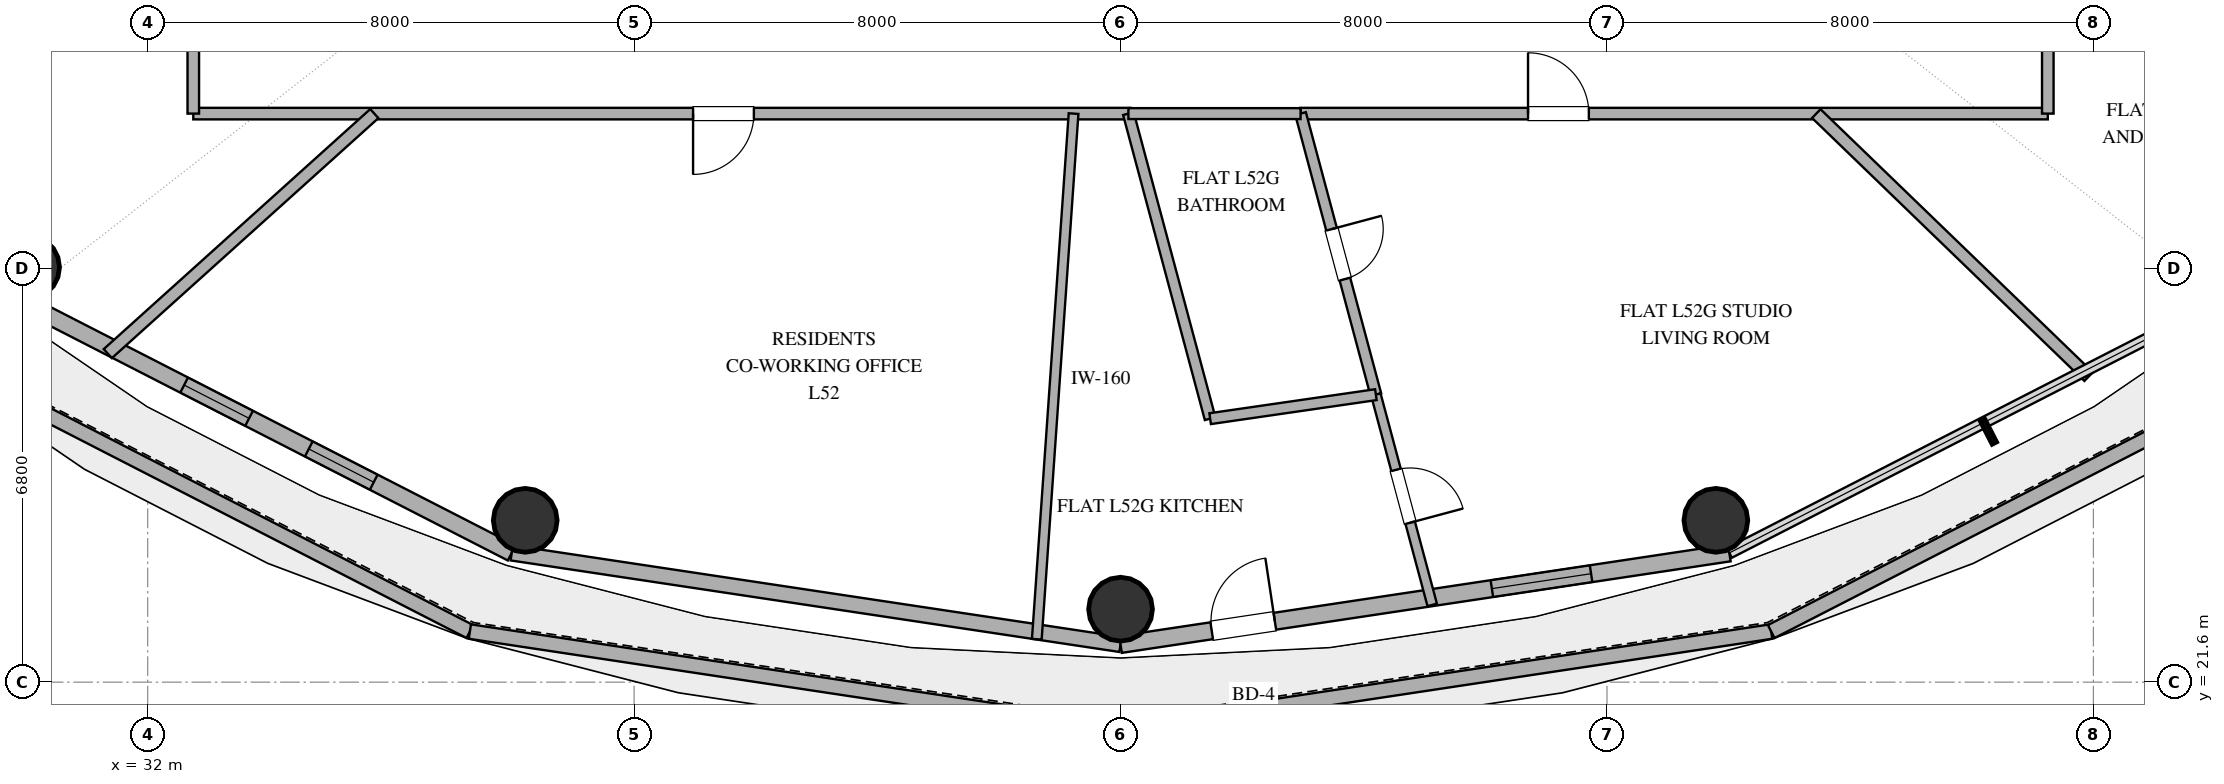
"""IFC4 building model, lengths in metres.
Left out: names, types, materials, properties, quantities, classifications, styles, units other than length and angle.
Written with IfcOpenShell. Run it as: python <this file> out.ifc"""

import sys

from ifc_helpers import new_model, si_unit, direction, frame, frame_2d, origin, origin_2d, place, context, subcontext, project, spatial, rectangle, hollow_circle, extrude, element, fill, save


model = new_model("IFC4")
c1 = context("Model", 3, precision=1e-05, world=origin(), true_north=direction((0.0, 1.0)))
c2 = subcontext(c1, "Body", "Model", "MODEL_VIEW")
j1 = project(units=[si_unit("LENGTHUNIT", "METRE"), si_unit("PLANEANGLEUNIT", "RADIAN")], contexts=[c1])
p1 = place(None, origin())
s1 = spatial("IfcSite", under=j1, at=p1, CompositionType="ELEMENT")
p2 = place(p1, origin())
s2 = spatial("IfcBuilding", under=s1, at=p2, CompositionType="ELEMENT")
p3 = place(p2, frame((0.0, 0.0, 206.4)))
s3 = spatial("IfcBuildingStorey", under=s2, at=p3, CompositionType="ELEMENT", Elevation=206.4)
for number, where, z_axis, x_axis in (
    (1, (30.025, 28.424, 0.0), (0.0, 0.0, 1.0), (1.0, 0.0, 0.0)),
    (2, (38.209, 24.261, 0.0), (0.0, 0.0, 1.0), (1.0, 0.0, 0.0)),
    (3, (48.0, 22.8, 0.0), (0.0, 0.0, 1.0), (1.0, 0.0, 0.0)),
    (4, (57.791, 24.261, 0.0), (0.0, 0.0, 1.0), (1.0, 0.0, 0.0)),
):
    element("IfcColumn", number, at=place(p3, frame(where, z_axis=z_axis, x_axis=x_axis)), inside=s3, PredefinedType="COLUMN", context=c2, shape_type="SweptSolid", body=[
        extrude(hollow_circle(Radius=0.525, WallThickness=0.028, at=origin_2d()), origin(), (0.0, 0.0, 1.0), 3.36),
    ])
p4 = place(p3, frame((28.354, 27.023, 0.0), z_axis=(0.0, 0.0, 1.0), x_axis=(0.889652072391, -0.456639015077, 0.0)))
e5 = element("IfcWall", 5, at=p4, inside=s3, PredefinedType="PARAPET", context=c2, shape_type="SweptSolid", body=[
    extrude(rectangle(XDim=10.055, YDim=0.24, at=frame_2d((5.027, 0.0))), origin(), (0.0, 0.0, 1.0), 1.25),
])
for number, where, z_axis, x_axis in (
    (6, (37.299, 22.432, 0.0), (0.0, 0.0, 1.0), (0.989, -0.149, 0.0)),
    (7, (48.0, 20.82, 0.0), (0.0, 0.0, 1.0), (0.989, 0.149, 0.0)),
):
    element("IfcWall", number, at=place(p3, frame(where, z_axis=z_axis, x_axis=x_axis)), inside=s3, PredefinedType="PARAPET", context=c2, shape_type="SweptSolid", body=[
        extrude(rectangle(XDim=10.822, YDim=0.24, at=frame_2d((5.411, 0.0))), origin(), (0.0, 0.0, 1.0), 1.25),
    ])
p5 = place(p3, frame((58.701, 22.432, 0.0), z_axis=(0.0, 0.0, 1.0), x_axis=(0.889652072391, 0.456639015077, 0.0)))
e8 = element("IfcWall", 8, at=p5, inside=s3, PredefinedType="PARAPET", context=c2, shape_type="SweptSolid", body=[
    extrude(rectangle(XDim=10.055, YDim=0.24, at=frame_2d((5.027, 0.0))), origin(), (0.0, 0.0, 1.0), 1.25),
])
p6 = place(p3, frame((29.617, 28.013, 0.0), z_axis=(0.0, 0.0, 1.0), x_axis=(0.890007394051, -0.455946091699, 0.0)))
e9 = element("IfcWall", 9, at=p6, inside=s3, PredefinedType="SOLIDWALL", context=c2, shape_type="SweptSolid", body=[
    extrude(rectangle(XDim=9.404, YDim=0.28, at=frame_2d((4.702, 0.0))), origin(), (0.0, 0.0, 1.0), 3.36),
])
p7 = place(p6, frame((3.351, 0.0, 0.85)))
e10 = element("IfcOpeningElement", 10, at=p7, cuts=e9, PredefinedType="OPENING", context=c2, shape_type="SweptSolid", body=[
    extrude(rectangle(XDim=1.2, YDim=1.6, at=frame_2d((0.6, 0.8))), frame((0.0, 0.15, 0.0), z_axis=(0.0, -1.0, 0.0), x_axis=(1.0, 0.0, 0.0)), (0.0, 0.0, 1.0), 0.3),
])
p8 = place(p6, frame((5.654, 0.0, 0.85)))
e11 = element("IfcOpeningElement", 11, at=p8, cuts=e9, PredefinedType="OPENING", context=c2, shape_type="SweptSolid", body=[
    extrude(rectangle(XDim=1.2, YDim=1.6, at=frame_2d((0.6, 0.8))), frame((0.0, 0.15, 0.0), z_axis=(0.0, -1.0, 0.0), x_axis=(1.0, 0.0, 0.0)), (0.0, 0.0, 1.0), 0.3),
])
p9 = place(p3, frame((37.987, 23.726, 0.0), z_axis=(0.0, 0.0, 1.0), x_axis=(0.988882522213, -0.148698881169, 0.0)))
e12 = element("IfcWall", 12, at=p9, inside=s3, PredefinedType="SOLIDWALL", context=c2, shape_type="SweptSolid", body=[
    extrude(rectangle(XDim=10.125, YDim=0.25, at=frame_2d((5.062, 0.0))), origin(), (0.0, 0.0, 1.0), 3.36),
])
p10 = place(p3, frame((48.0, 22.22, 0.0), z_axis=(0.0, 0.0, 1.0), x_axis=(0.988882522213, 0.148698881169, 0.0)))
e13 = element("IfcWall", 13, at=p10, inside=s3, PredefinedType="SOLIDWALL", context=c2, shape_type="SweptSolid", body=[
    extrude(rectangle(XDim=10.125, YDim=0.28, at=frame_2d((5.062, 0.0))), origin(), (0.0, 0.0, 1.0), 3.36),
])
p11 = place(p10, frame((1.516, 0.0, 0.0)))
e14 = element("IfcOpeningElement", 14, at=p11, cuts=e13, PredefinedType="OPENING", context=c2, shape_type="SweptSolid", body=[
    extrude(rectangle(XDim=1.05, YDim=2.2, at=frame_2d((0.525, 1.1))), frame((0.0, 0.15, 0.0), z_axis=(0.0, -1.0, 0.0), x_axis=(1.0, 0.0, 0.0)), (0.0, 0.0, 1.0), 0.3),
])
p12 = place(p10, frame((6.176, 0.0, 0.85)))
e15 = element("IfcOpeningElement", 15, at=p12, cuts=e13, PredefinedType="OPENING", context=c2, shape_type="SweptSolid", body=[
    extrude(rectangle(XDim=1.65, YDim=2.0, at=frame_2d((0.825, 1.0))), frame((0.0, 0.15, 0.0), z_axis=(0.0, -1.0, 0.0), x_axis=(1.0, 0.0, 0.0)), (0.0, 0.0, 1.0), 0.3),
])
p13 = place(p3, frame((48.162, 30.95, 0.0), z_axis=(0.0, 0.0, 1.0), x_axis=(-1.0, 0.0, 0.0)))
e16 = element("IfcWall", 16, at=p13, inside=s3, PredefinedType="PARTITIONING", context=c2, shape_type="SweptSolid", body=[
    extrude(rectangle(XDim=15.412, YDim=0.19, at=frame_2d((7.706, 0.0))), origin(), (0.0, 0.0, 1.0), 2.72),
])
p14 = place(p13, frame((6.193, 0.0, 0.0)))
e17 = element("IfcOpeningElement", 17, at=p14, cuts=e16, PredefinedType="OPENING", context=c2, shape_type="SweptSolid", body=[
    extrude(rectangle(XDim=1.0, YDim=2.2, at=frame_2d((0.5, 1.1))), frame((0.0, 0.105, 0.0), z_axis=(0.0, -1.0, 0.0), x_axis=(1.0, 0.0, 0.0)), (0.0, 0.0, 1.0), 0.21),
])
p15 = place(p3, frame((47.227, 30.95, 0.0), z_axis=(0.0, 0.0, 1.0), x_axis=(-0.069763237321, -0.997563577281, 0.0)))
e18 = element("IfcWall", 18, at=p15, inside=s3, PredefinedType="PLUMBINGWALL", context=c2, shape_type="SweptSolid", body=[
    extrude(rectangle(XDim=8.665, YDim=0.16, at=frame_2d((4.333, 0.0))), origin(), (0.0, 0.0, 1.0), 2.72),
])
p16 = place(p3, frame((50.961, 30.95, 0.0), z_axis=(0.0, 0.0, 1.0), x_axis=(1.0, 0.0, 0.0)))
e19 = element("IfcWall", 19, at=p16, inside=s3, PredefinedType="PARTITIONING", context=c2, shape_type="SweptSolid", body=[
    extrude(rectangle(XDim=12.289, YDim=0.19, at=frame_2d((6.145, 0.0))), origin(), (0.0, 0.0, 1.0), 2.72),
])
p17 = place(p16, frame((3.741, 0.0, 0.0)))
e20 = element("IfcOpeningElement", 20, at=p17, cuts=e19, PredefinedType="OPENING", context=c2, shape_type="SweptSolid", body=[
    extrude(rectangle(XDim=1.0, YDim=2.2, at=frame_2d((0.5, 1.1))), frame((0.0, 0.105, 0.0), z_axis=(0.0, -1.0, 0.0), x_axis=(1.0, 0.0, 0.0)), (0.0, 0.0, 1.0), 0.21),
])
p18 = place(p3, frame((32.75, 30.95, 0.0), z_axis=(0.0, 0.0, 1.0), x_axis=(0.0, 1.0, 0.0)))
e21 = element("IfcWall", 21, at=p18, inside=s3, PredefinedType="PARTITIONING", context=c2, shape_type="SweptSolid", body=[
    extrude(rectangle(XDim=12.148, YDim=0.19, at=frame_2d((6.074, 0.0))), origin(), (0.0, 0.0, 1.0), 2.72),
])
p19 = place(p18, frame((3.214, 0.0, 0.0)))
e22 = element("IfcOpeningElement", 22, at=p19, cuts=e21, PredefinedType="OPENING", context=c2, shape_type="SweptSolid", body=[
    extrude(rectangle(XDim=1.0, YDim=2.2, at=frame_2d((0.5, 1.1))), frame((0.0, 0.105, 0.0), z_axis=(0.0, -1.0, 0.0), x_axis=(1.0, 0.0, 0.0)), (0.0, 0.0, 1.0), 0.21),
])
p20 = place(p3, frame((63.921, 26.625, 0.0), z_axis=(0.0, 0.0, 1.0), x_axis=(-0.719350784266, 0.69464699609, 0.0)))
e23 = element("IfcWall", 23, at=p20, inside=s3, PredefinedType="PARTITIONING", context=c2, shape_type="SweptSolid", body=[
    extrude(rectangle(XDim=6.226, YDim=0.2, at=frame_2d((3.113, 0.0))), origin(), (0.0, 0.0, 1.0), 2.72),
])
p21 = place(p3, frame((63.25, 45.419, 0.0), z_axis=(0.0, 0.0, 1.0), x_axis=(0.0, -1.0, 0.0)))
e24 = element("IfcWall", 24, at=p21, inside=s3, PredefinedType="PARTITIONING", context=c2, shape_type="SweptSolid", body=[
    extrude(rectangle(XDim=14.469, YDim=0.19, at=frame_2d((7.235, 0.0))), origin(), (0.0, 0.0, 1.0), 2.72),
])
p22 = place(p21, frame((10.905, 0.0, 0.0)))
e25 = element("IfcOpeningElement", 25, at=p22, cuts=e24, PredefinedType="OPENING", context=c2, shape_type="SweptSolid", body=[
    extrude(rectangle(XDim=1.0, YDim=2.2, at=frame_2d((0.5, 1.1))), frame((0.0, 0.105, 0.0), z_axis=(0.0, -1.0, 0.0), x_axis=(1.0, 0.0, 0.0)), (0.0, 0.0, 1.0), 0.21),
])
p23 = place(p3, frame((35.728, 30.95, 0.0), z_axis=(0.0, 0.0, 1.0), x_axis=(-0.743158305959, -0.669115634464, 0.0)))
e26 = element("IfcWall", 26, at=p23, inside=s3, PredefinedType="PARTITIONING", context=c2, shape_type="SweptSolid", body=[
    extrude(rectangle(XDim=5.899, YDim=0.2, at=frame_2d((2.949, 0.0))), origin(), (0.0, 0.0, 1.0), 2.72),
])
p24 = place(p3, frame((49.473, 25.933, 0.0), z_axis=(0.0, 0.0, 1.0), x_axis=(-0.258826939486, 0.965923710961, 0.0)))
e27 = element("IfcWall", 27, at=p24, inside=s3, PredefinedType="PLUMBINGWALL", context=c2, shape_type="SweptSolid", body=[
    extrude(rectangle(XDim=5.194, YDim=0.18, at=frame_2d((2.597, 0.0))), origin(), (0.0, 0.0, 1.0), 2.72),
])
p25 = place(p3, frame((50.961, 30.95, 0.0), z_axis=(0.0, 0.0, 1.0), x_axis=(0.258827893949, -0.965923455204, 0.0)))
e28 = element("IfcWall", 28, at=p25, inside=s3, PredefinedType="PLUMBINGWALL", context=c2, shape_type="SweptSolid", body=[
    extrude(rectangle(XDim=4.785, YDim=0.18, at=frame_2d((2.393, 0.0))), origin(), (0.0, 0.0, 1.0), 2.72),
])
p26 = place(p25, frame((1.968, 0.0, 0.0)))
e29 = element("IfcOpeningElement", 29, at=p26, cuts=e28, PredefinedType="OPENING", context=c2, shape_type="SweptSolid", body=[
    extrude(rectangle(XDim=0.85, YDim=2.1, at=frame_2d((0.425, 1.05))), frame((0.0, 0.1, 0.0), z_axis=(0.0, -1.0, 0.0), x_axis=(1.0, 0.0, 0.0)), (0.0, 0.0, 1.0), 0.2),
])
p27 = place(p3, frame((52.199, 26.328, 0.0), z_axis=(0.0, 0.0, 1.0), x_axis=(0.258821309613, -0.965925219512, 0.0)))
e30 = element("IfcWall", 30, at=p27, inside=s3, PredefinedType="PLUMBINGWALL", context=c2, shape_type="SweptSolid", body=[
    extrude(rectangle(XDim=3.58, YDim=0.16, at=frame_2d((1.79, 0.0))), origin(), (0.0, 0.0, 1.0), 2.72),
])
p28 = place(p27, frame((1.28, 0.0, 0.0)))
e31 = element("IfcOpeningElement", 31, at=p28, cuts=e30, PredefinedType="OPENING", context=c2, shape_type="SweptSolid", body=[
    extrude(rectangle(XDim=0.9, YDim=2.1, at=frame_2d((0.45, 1.05))), frame((0.0, 0.09, 0.0), z_axis=(0.0, -1.0, 0.0), x_axis=(1.0, 0.0, 0.0)), (0.0, 0.0, 1.0), 0.18),
])
p29 = place(p3, frame((48.129, 30.95, 0.0), z_axis=(0.0, 0.0, 1.0), x_axis=(1.0, 0.0, 0.0)))
e32 = element("IfcWall", 32, at=p29, inside=s3, PredefinedType="PLUMBINGWALL", context=c2, shape_type="SweptSolid", body=[
    extrude(rectangle(XDim=2.832, YDim=0.18, at=frame_2d((1.416, 0.0))), origin(), (0.0, 0.0, 1.0), 2.72),
])
p30 = place(p3, frame((52.199, 26.328, 0.0), z_axis=(0.0, 0.0, 1.0), x_axis=(-0.989687205531, -0.143245367142, 0.0)))
e33 = element("IfcWall", 33, at=p30, inside=s3, PredefinedType="PLUMBINGWALL", context=c2, shape_type="SweptSolid", body=[
    extrude(rectangle(XDim=2.754, YDim=0.18, at=frame_2d((1.377, 0.0))), origin(), (0.0, 0.0, 1.0), 2.72),
])
p31 = place(p7, origin())
e34 = element("IfcWindow", 34, at=p31, inside=s3, PartitioningType="SINGLE_PANEL", PredefinedType="WINDOW", context=c2, shape_type="SweptSolid", body=[
    extrude(rectangle(XDim=1.2, YDim=1.6, at=frame_2d((0.6, 0.8))), frame((0.0, 0.03, 0.0), z_axis=(0.0, -1.0, 0.0), x_axis=(1.0, 0.0, 0.0)), (0.0, 0.0, 1.0), 0.06),
])
fill(e10, e34)
p32 = place(p8, origin())
e35 = element("IfcWindow", 35, at=p32, inside=s3, PartitioningType="SINGLE_PANEL", PredefinedType="WINDOW", context=c2, shape_type="SweptSolid", body=[
    extrude(rectangle(XDim=1.2, YDim=1.6, at=frame_2d((0.6, 0.8))), frame((0.0, 0.03, 0.0), z_axis=(0.0, -1.0, 0.0), x_axis=(1.0, 0.0, 0.0)), (0.0, 0.0, 1.0), 0.06),
])
fill(e11, e35)
p33 = place(p11, origin())
e36 = element("IfcDoor", 36, at=p33, inside=s3, OperationType="SINGLE_SWING_RIGHT", PredefinedType="DOOR", context=c2, shape_type="SweptSolid", body=[
    extrude(rectangle(XDim=1.05, YDim=2.2, at=frame_2d((0.525, 1.1))), frame((0.0, 0.025, 0.0), z_axis=(0.0, -1.0, 0.0), x_axis=(1.0, 0.0, 0.0)), (0.0, 0.0, 1.0), 0.05),
])
fill(e14, e36)
p34 = place(p12, origin())
e37 = element("IfcWindow", 37, at=p34, inside=s3, PartitioningType="SINGLE_PANEL", PredefinedType="WINDOW", context=c2, shape_type="SweptSolid", body=[
    extrude(rectangle(XDim=1.65, YDim=2.0, at=frame_2d((0.825, 1.0))), frame((0.0, 0.03, 0.0), z_axis=(0.0, -1.0, 0.0), x_axis=(1.0, 0.0, 0.0)), (0.0, 0.0, 1.0), 0.06),
])
fill(e15, e37)
p35 = place(p14, origin())
e38 = element("IfcDoor", 38, at=p35, inside=s3, OperationType="SINGLE_SWING_RIGHT", PredefinedType="DOOR", context=c2, shape_type="SweptSolid", body=[
    extrude(rectangle(XDim=1.0, YDim=2.2, at=frame_2d((0.5, 1.1))), frame((0.0, 0.025, 0.0), z_axis=(0.0, -1.0, 0.0), x_axis=(1.0, 0.0, 0.0)), (0.0, 0.0, 1.0), 0.05),
])
fill(e17, e38)
p36 = place(p17, origin())
e39 = element("IfcDoor", 39, at=p36, inside=s3, OperationType="SINGLE_SWING_LEFT", PredefinedType="DOOR", context=c2, shape_type="SweptSolid", body=[
    extrude(rectangle(XDim=1.0, YDim=2.2, at=frame_2d((0.5, 1.1))), frame((0.0, 0.025, 0.0), z_axis=(0.0, -1.0, 0.0), x_axis=(1.0, 0.0, 0.0)), (0.0, 0.0, 1.0), 0.05),
])
fill(e20, e39)
p37 = place(p26, origin())
e40 = element("IfcDoor", 40, at=p37, inside=s3, OperationType="SINGLE_SWING_LEFT", PredefinedType="DOOR", context=c2, shape_type="SweptSolid", body=[
    extrude(rectangle(XDim=0.85, YDim=2.1, at=frame_2d((0.425, 1.05))), frame((0.0, 0.025, 0.0), z_axis=(0.0, -1.0, 0.0), x_axis=(1.0, 0.0, 0.0)), (0.0, 0.0, 1.0), 0.05),
])
fill(e29, e40)
p38 = place(p28, origin())
e41 = element("IfcDoor", 41, at=p38, inside=s3, OperationType="SINGLE_SWING_RIGHT", PredefinedType="DOOR", context=c2, shape_type="SweptSolid", body=[
    extrude(rectangle(XDim=0.9, YDim=2.1, at=frame_2d((0.45, 1.05))), frame((0.0, 0.025, 0.0), z_axis=(0.0, -1.0, 0.0), x_axis=(1.0, 0.0, 0.0)), (0.0, 0.0, 1.0), 0.05),
])
fill(e31, e41)
save(model, sys.argv[1])
